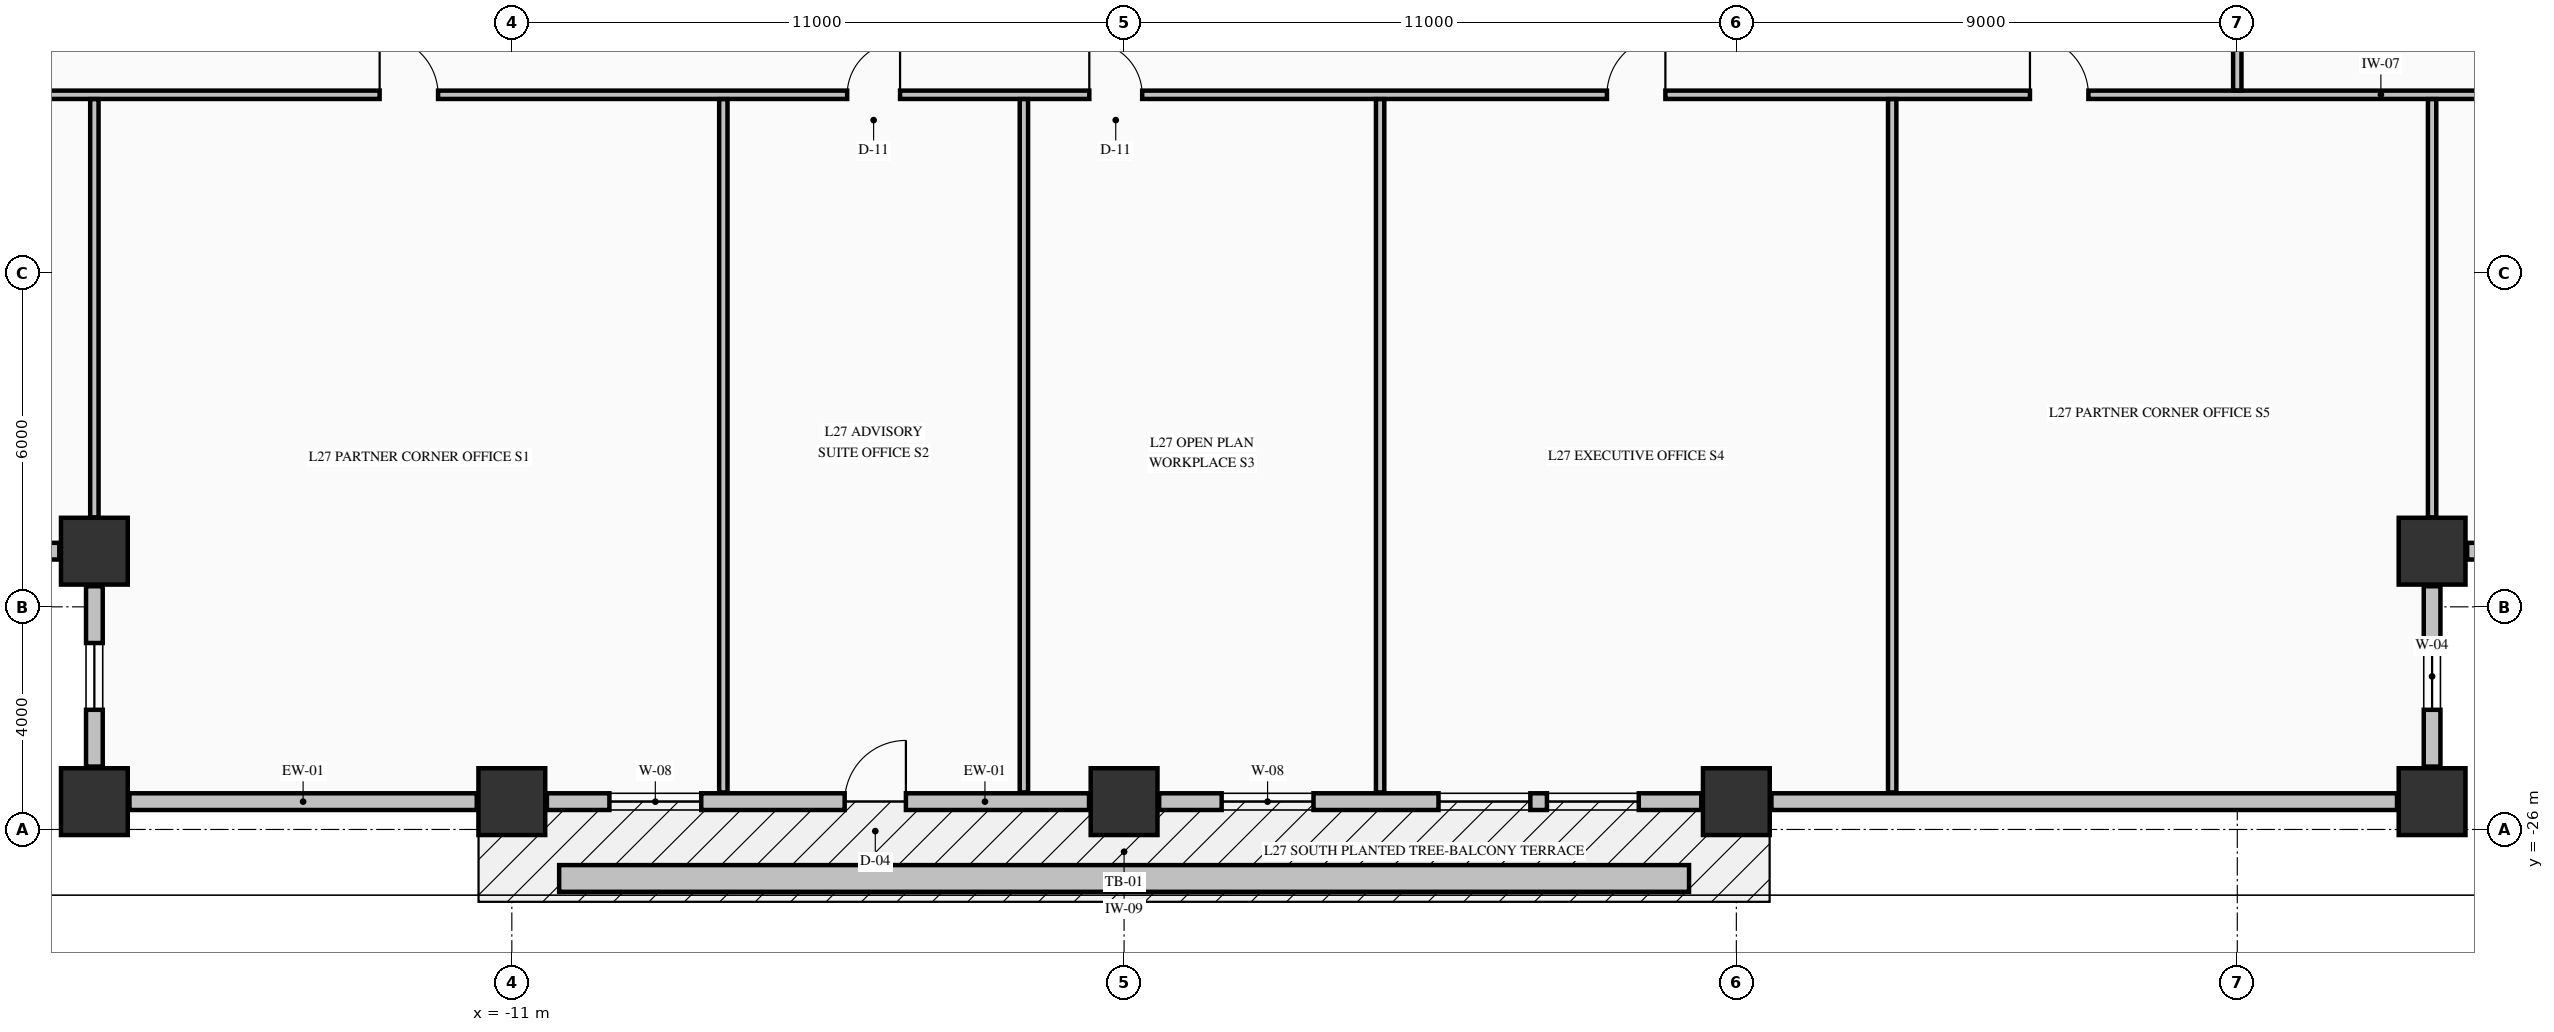
"""IFC4 building model, lengths in metres.
Left out: names, types, materials, properties, quantities, classifications, styles, units other than length and angle.
Written with IfcOpenShell. Run it as: python <this file> out.ifc"""

import sys

from ifc_helpers import new_model, si_unit, direction, frame, frame_2d, origin, origin_2d, place, context, subcontext, project, spatial, rectangle, extrude, element, fill, save


model = new_model("IFC4")
c1 = context("Model", 3, precision=1e-05, world=origin(), true_north=direction((0.0, 1.0)))
c2 = subcontext(c1, "Body", "Model", "MODEL_VIEW")
j1 = project(units=[si_unit("LENGTHUNIT", "METRE"), si_unit("PLANEANGLEUNIT", "RADIAN")], contexts=[c1])
p1 = place(None, origin())
s1 = spatial("IfcSite", under=j1, at=p1, CompositionType="ELEMENT")
p2 = place(p1, origin())
s2 = spatial("IfcBuilding", under=s1, at=p2, CompositionType="ELEMENT")
p3 = place(p2, frame((0.0, 0.0, 109.21)))
s3 = spatial("IfcBuildingStorey", under=s2, at=p3, CompositionType="ELEMENT", Elevation=109.21)
for number, where, z_axis, x_axis in (
    (1, (-18.5, -25.5, -0.25), (0.0, 0.0, 1.0), (1.0, 0.0, 0.0)),
    (2, (-11.0, -25.5, -0.25), (0.0, 0.0, 1.0), (1.0, 0.0, 0.0)),
    (3, (0.0, -25.5, -0.25), (0.0, 0.0, 1.0), (1.0, 0.0, 0.0)),
    (4, (11.0, -25.5, -0.25), (0.0, 0.0, 1.0), (1.0, 0.0, 0.0)),
    (5, (23.5, -25.5, -0.25), (0.0, 0.0, 1.0), (1.0, 0.0, 0.0)),
    (6, (-18.5, -21.0, -0.25), (0.0, 0.0, 1.0), (1.0, 0.0, 0.0)),
    (7, (23.5, -21.0, -0.25), (0.0, 0.0, 1.0), (1.0, 0.0, 0.0)),
):
    element("IfcColumn", number, at=place(p3, frame(where, z_axis=z_axis, x_axis=x_axis)), inside=s3, PredefinedType="COLUMN", context=c2, shape_type="SweptSolid", body=[
        extrude(rectangle(XDim=1.2, YDim=1.2, at=origin_2d()), origin(), (0.0, 0.0, 1.0), 3.57),
    ])
p4 = place(p3, frame((23.5, -24.87, 0.0), z_axis=(0.0, 0.0, 1.0), x_axis=(0.0, 1.0, 0.0)))
e8 = element("IfcWall", 8, at=p4, inside=s3, PredefinedType="STANDARD", context=c2, shape_type="SweptSolid", body=[
    extrude(rectangle(XDim=3.24, YDim=0.3, at=frame_2d((1.62, 0.0))), origin(), (0.0, 0.0, 1.0), 2.712),
])
p5 = place(p4, frame((1.02, 0.0, 0.82)))
e9 = element("IfcOpeningElement", 9, at=p5, cuts=e8, PredefinedType="OPENING", context=c2, shape_type="SweptSolid", body=[
    extrude(rectangle(XDim=1.2, YDim=1.65, at=frame_2d((0.6, 0.825))), frame((0.0, 0.16, 0.0), z_axis=(0.0, -1.0, 0.0), x_axis=(1.0, 0.0, 0.0)), (0.0, 0.0, 1.0), 0.32),
])
p6 = place(p3, frame((24.13, -21.0, 0.0), z_axis=(0.0, 0.0, 1.0), x_axis=(1.0, 0.0, 0.0)))
e10 = element("IfcWall", 10, at=p6, inside=s3, PredefinedType="STANDARD", context=c2, shape_type="SweptSolid", body=[
    extrude(rectangle(XDim=3.24, YDim=0.3, at=frame_2d((1.62, 0.0))), origin(), (0.0, 0.0, 1.0), 2.712),
])
p7 = place(p6, frame((1.02, 0.0, 0.82)))
e11 = element("IfcOpeningElement", 11, at=p7, cuts=e10, PredefinedType="OPENING", context=c2, shape_type="SweptSolid", body=[
    extrude(rectangle(XDim=1.2, YDim=1.65, at=frame_2d((0.6, 0.825))), frame((0.0, 0.16, 0.0), z_axis=(0.0, -1.0, 0.0), x_axis=(1.0, 0.0, 0.0)), (0.0, 0.0, 1.0), 0.32),
])
p8 = place(p3, frame((-22.37, -21.0, 0.0), z_axis=(0.0, 0.0, 1.0), x_axis=(1.0, 0.0, 0.0)))
e12 = element("IfcWall", 12, at=p8, inside=s3, PredefinedType="STANDARD", context=c2, shape_type="SweptSolid", body=[
    extrude(rectangle(XDim=3.24, YDim=0.3, at=frame_2d((1.62, 0.0))), origin(), (0.0, 0.0, 1.0), 2.712),
])
p9 = place(p8, frame((1.02, 0.0, 0.82)))
e13 = element("IfcOpeningElement", 13, at=p9, cuts=e12, PredefinedType="OPENING", context=c2, shape_type="SweptSolid", body=[
    extrude(rectangle(XDim=1.2, YDim=1.65, at=frame_2d((0.6, 0.825))), frame((0.0, 0.16, 0.0), z_axis=(0.0, -1.0, 0.0), x_axis=(1.0, 0.0, 0.0)), (0.0, 0.0, 1.0), 0.32),
])
p10 = place(p3, frame((-18.5, -21.63, 0.0), z_axis=(0.0, 0.0, 1.0), x_axis=(0.0, -1.0, 0.0)))
e14 = element("IfcWall", 14, at=p10, inside=s3, PredefinedType="STANDARD", context=c2, shape_type="SweptSolid", body=[
    extrude(rectangle(XDim=3.24, YDim=0.3, at=frame_2d((1.62, 0.0))), origin(), (0.0, 0.0, 1.0), 2.712),
])
p11 = place(p10, frame((1.02, 0.0, 0.82)))
e15 = element("IfcOpeningElement", 15, at=p11, cuts=e14, PredefinedType="OPENING", context=c2, shape_type="SweptSolid", body=[
    extrude(rectangle(XDim=1.2, YDim=1.65, at=frame_2d((0.6, 0.825))), frame((0.0, 0.16, 0.0), z_axis=(0.0, -1.0, 0.0), x_axis=(1.0, 0.0, 0.0)), (0.0, 0.0, 1.0), 0.32),
])
p12 = place(p3, frame((-17.87, -25.5, 0.0), z_axis=(0.0, 0.0, 1.0), x_axis=(1.0, 0.0, 0.0)))
e16 = element("IfcWall", 16, at=p12, inside=s3, PredefinedType="STANDARD", context=c2, shape_type="SweptSolid", body=[
    extrude(rectangle(XDim=6.24, YDim=0.3, at=frame_2d((3.12, 0.0))), origin(), (0.0, 0.0, 1.0), 2.712),
])
p13 = place(p3, frame((-10.37, -25.5, 0.0), z_axis=(0.0, 0.0, 1.0), x_axis=(1.0, 0.0, 0.0)))
e17 = element("IfcWall", 17, at=p13, inside=s3, PredefinedType="STANDARD", context=c2, shape_type="SweptSolid", body=[
    extrude(rectangle(XDim=9.74, YDim=0.3, at=frame_2d((4.87, 0.0))), origin(), (0.0, 0.0, 1.0), 2.712),
])
p14 = place(p13, frame((5.35, 0.0, 0.0)))
e18 = element("IfcOpeningElement", 18, at=p14, cuts=e17, PredefinedType="OPENING", context=c2, shape_type="SweptSolid", body=[
    extrude(rectangle(XDim=1.1, YDim=2.15, at=frame_2d((0.55, 1.075))), frame((0.0, 0.16, 0.0), z_axis=(0.0, -1.0, 0.0), x_axis=(1.0, 0.0, 0.0)), (0.0, 0.0, 1.0), 0.32),
])
p15 = place(p13, frame((1.123, 0.0, 0.8)))
e19 = element("IfcOpeningElement", 19, at=p15, cuts=e17, PredefinedType="OPENING", context=c2, shape_type="SweptSolid", body=[
    extrude(rectangle(XDim=1.65, YDim=1.7, at=frame_2d((0.825, 0.85))), frame((0.0, 0.16, 0.0), z_axis=(0.0, -1.0, 0.0), x_axis=(1.0, 0.0, 0.0)), (0.0, 0.0, 1.0), 0.32),
])
p16 = place(p3, frame((0.63, -25.5, 0.0), z_axis=(0.0, 0.0, 1.0), x_axis=(1.0, 0.0, 0.0)))
e20 = element("IfcWall", 20, at=p16, inside=s3, PredefinedType="STANDARD", context=c2, shape_type="SweptSolid", body=[
    extrude(rectangle(XDim=9.74, YDim=0.3, at=frame_2d((4.87, 0.0))), origin(), (0.0, 0.0, 1.0), 2.712),
])
p17 = place(p16, frame((1.123, 0.0, 0.8)))
e21 = element("IfcOpeningElement", 21, at=p17, cuts=e20, PredefinedType="OPENING", context=c2, shape_type="SweptSolid", body=[
    extrude(rectangle(XDim=1.65, YDim=1.7, at=frame_2d((0.825, 0.85))), frame((0.0, 0.16, 0.0), z_axis=(0.0, -1.0, 0.0), x_axis=(1.0, 0.0, 0.0)), (0.0, 0.0, 1.0), 0.32),
])
p18 = place(p16, frame((5.019, 0.0, 0.8)))
e22 = element("IfcOpeningElement", 22, at=p18, cuts=e20, PredefinedType="OPENING", context=c2, shape_type="SweptSolid", body=[
    extrude(rectangle(XDim=1.65, YDim=1.7, at=frame_2d((0.825, 0.85))), frame((0.0, 0.16, 0.0), z_axis=(0.0, -1.0, 0.0), x_axis=(1.0, 0.0, 0.0)), (0.0, 0.0, 1.0), 0.32),
])
p19 = place(p16, frame((6.967, 0.0, 0.8)))
e23 = element("IfcOpeningElement", 23, at=p19, cuts=e20, PredefinedType="OPENING", context=c2, shape_type="SweptSolid", body=[
    extrude(rectangle(XDim=1.65, YDim=1.7, at=frame_2d((0.825, 0.85))), frame((0.0, 0.16, 0.0), z_axis=(0.0, -1.0, 0.0), x_axis=(1.0, 0.0, 0.0)), (0.0, 0.0, 1.0), 0.32),
])
p20 = place(p3, frame((11.63, -25.5, 0.0), z_axis=(0.0, 0.0, 1.0), x_axis=(1.0, 0.0, 0.0)))
e24 = element("IfcWall", 24, at=p20, inside=s3, PredefinedType="STANDARD", context=c2, shape_type="SweptSolid", body=[
    extrude(rectangle(XDim=11.24, YDim=0.3, at=frame_2d((5.62, 0.0))), origin(), (0.0, 0.0, 1.0), 2.712),
])
p21 = place(p3, frame((-22.835, -12.8, 0.0), z_axis=(0.0, 0.0, 1.0), x_axis=(1.0, 0.0, 0.0)))
e25 = element("IfcWall", 25, at=p21, inside=s3, PredefinedType="PARTITIONING", context=c2, shape_type="SweptSolid", body=[
    extrude(rectangle(XDim=50.67, YDim=0.15, at=frame_2d((25.335, 0.0))), origin(), (0.0, 0.0, 1.0), 3.32),
])
p22 = place(p21, frame((9.46, 0.0, 0.0)))
e26 = element("IfcOpeningElement", 26, at=p22, cuts=e25, PredefinedType="OPENING", context=c2, shape_type="SweptSolid", body=[
    extrude(rectangle(XDim=1.05, YDim=2.15, at=frame_2d((0.525, 1.075))), frame((0.0, 0.085, 0.0), z_axis=(0.0, -1.0, 0.0), x_axis=(1.0, 0.0, 0.0)), (0.0, 0.0, 1.0), 0.17),
])
p23 = place(p21, frame((17.86, 0.0, 0.0)))
e27 = element("IfcOpeningElement", 27, at=p23, cuts=e25, PredefinedType="OPENING", context=c2, shape_type="SweptSolid", body=[
    extrude(rectangle(XDim=0.95, YDim=2.15, at=frame_2d((0.475, 1.075))), frame((0.0, 0.085, 0.0), z_axis=(0.0, -1.0, 0.0), x_axis=(1.0, 0.0, 0.0)), (0.0, 0.0, 1.0), 0.17),
])
p24 = place(p21, frame((22.21, 0.0, 0.0)))
e28 = element("IfcOpeningElement", 28, at=p24, cuts=e25, PredefinedType="OPENING", context=c2, shape_type="SweptSolid", body=[
    extrude(rectangle(XDim=0.95, YDim=2.15, at=frame_2d((0.475, 1.075))), frame((0.0, 0.085, 0.0), z_axis=(0.0, -1.0, 0.0), x_axis=(1.0, 0.0, 0.0)), (0.0, 0.0, 1.0), 0.17),
])
p25 = place(p21, frame((31.51, 0.0, 0.0)))
e29 = element("IfcOpeningElement", 29, at=p25, cuts=e25, PredefinedType="OPENING", context=c2, shape_type="SweptSolid", body=[
    extrude(rectangle(XDim=1.05, YDim=2.15, at=frame_2d((0.525, 1.075))), frame((0.0, 0.085, 0.0), z_axis=(0.0, -1.0, 0.0), x_axis=(1.0, 0.0, 0.0)), (0.0, 0.0, 1.0), 0.17),
])
p26 = place(p21, frame((39.11, 0.0, 0.0)))
e30 = element("IfcOpeningElement", 30, at=p26, cuts=e25, PredefinedType="OPENING", context=c2, shape_type="SweptSolid", body=[
    extrude(rectangle(XDim=1.05, YDim=2.15, at=frame_2d((0.525, 1.075))), frame((0.0, 0.085, 0.0), z_axis=(0.0, -1.0, 0.0), x_axis=(1.0, 0.0, 0.0)), (0.0, 0.0, 1.0), 0.17),
])
p27 = place(p3, frame((-18.5, -20.394, 0.0), z_axis=(0.0, 0.0, 1.0), x_axis=(0.0, 1.0, 0.0)))
e31 = element("IfcWall", 31, at=p27, inside=s3, PredefinedType="PARTITIONING", context=c2, shape_type="SweptSolid", body=[
    extrude(rectangle(XDim=7.516, YDim=0.15, at=frame_2d((3.758, 0.0))), origin(), (0.0, 0.0, 1.0), 3.32),
])
for number, where, z_axis, x_axis in (
    (32, (-7.2, -25.335, 0.0), (0.0, 0.0, 1.0), (0.0, 1.0, 0.0)),
    (33, (-1.8, -25.335, 0.0), (0.0, 0.0, 1.0), (0.0, 1.0, 0.0)),
    (34, (4.6, -25.335, 0.0), (0.0, 0.0, 1.0), (0.0, 1.0, 0.0)),
    (35, (13.8, -25.335, 0.0), (0.0, 0.0, 1.0), (0.0, 1.0, 0.0)),
):
    element("IfcWall", number, at=place(p3, frame(where, z_axis=z_axis, x_axis=x_axis)), inside=s3, PredefinedType="PARTITIONING", context=c2, shape_type="SweptSolid", body=[
        extrude(rectangle(XDim=12.457, YDim=0.15, at=frame_2d((6.229, 0.0))), origin(), (0.0, 0.0, 1.0), 3.32),
    ])
p28 = place(p3, frame((20.0, -12.722, 0.0), z_axis=(0.0, 0.0, 1.0), x_axis=(0.0, 1.0, 0.0)))
e36 = element("IfcWall", 36, at=p28, inside=s3, PredefinedType="PARTITIONING", context=c2, shape_type="SweptSolid", body=[
    extrude(rectangle(XDim=2.266, YDim=0.15, at=frame_2d((1.133, 0.0))), origin(), (0.0, 0.0, 1.0), 2.81),
])
p29 = place(p28, frame((0.867, 0.0, 0.0)))
e37 = element("IfcOpeningElement", 37, at=p29, cuts=e36, PredefinedType="OPENING", context=c2, shape_type="SweptSolid", body=[
    extrude(rectangle(XDim=0.95, YDim=2.15, at=frame_2d((0.475, 1.075))), frame((0.0, 0.085, 0.0), z_axis=(0.0, -1.0, 0.0), x_axis=(1.0, 0.0, 0.0)), (0.0, 0.0, 1.0), 0.17),
])
p30 = place(p3, frame((23.5, -20.394, 0.0), z_axis=(0.0, 0.0, 1.0), x_axis=(0.0, 1.0, 0.0)))
e38 = element("IfcWall", 38, at=p30, inside=s3, PredefinedType="PARTITIONING", context=c2, shape_type="SweptSolid", body=[
    extrude(rectangle(XDim=7.516, YDim=0.15, at=frame_2d((3.758, 0.0))), origin(), (0.0, 0.0, 1.0), 3.32),
])
p31 = place(p3, frame((-10.15, -26.88, -0.04), z_axis=(0.0, 0.0, 1.0), x_axis=(1.0, 0.0, 0.0)))
e39 = element("IfcWall", 39, at=p31, inside=s3, PredefinedType="PARAPET", context=c2, shape_type="SweptSolid", body=[
    extrude(rectangle(XDim=20.3, YDim=0.48, at=frame_2d((10.15, 0.0))), origin(), (0.0, 0.0, 1.0), 0.52),
])
p32 = place(p5, origin())
e40 = element("IfcWindow", 40, at=p32, inside=s3, PartitioningType="SINGLE_PANEL", PredefinedType="WINDOW", context=c2, shape_type="SweptSolid", body=[
    extrude(rectangle(XDim=1.2, YDim=1.65, at=frame_2d((0.6, 0.825))), frame((0.0, 0.03, 0.0), z_axis=(0.0, -1.0, 0.0), x_axis=(1.0, 0.0, 0.0)), (0.0, 0.0, 1.0), 0.06),
])
fill(e9, e40)
p33 = place(p11, origin())
e41 = element("IfcWindow", 41, at=p33, inside=s3, PartitioningType="SINGLE_PANEL", PredefinedType="WINDOW", context=c2, shape_type="SweptSolid", body=[
    extrude(rectangle(XDim=1.2, YDim=1.65, at=frame_2d((0.6, 0.825))), frame((0.0, 0.03, 0.0), z_axis=(0.0, -1.0, 0.0), x_axis=(1.0, 0.0, 0.0)), (0.0, 0.0, 1.0), 0.06),
])
fill(e15, e41)
p34 = place(p14, origin())
e42 = element("IfcDoor", 42, at=p34, inside=s3, OperationType="SINGLE_SWING_RIGHT", PredefinedType="DOOR", context=c2, shape_type="SweptSolid", body=[
    extrude(rectangle(XDim=1.1, YDim=2.15, at=frame_2d((0.55, 1.075))), frame((0.0, 0.025, 0.0), z_axis=(0.0, -1.0, 0.0), x_axis=(1.0, 0.0, 0.0)), (0.0, 0.0, 1.0), 0.05),
])
fill(e18, e42)
p35 = place(p15, origin())
e43 = element("IfcWindow", 43, at=p35, inside=s3, PartitioningType="SINGLE_PANEL", PredefinedType="WINDOW", context=c2, shape_type="SweptSolid", body=[
    extrude(rectangle(XDim=1.65, YDim=1.7, at=frame_2d((0.825, 0.85))), frame((0.0, 0.03, 0.0), z_axis=(0.0, -1.0, 0.0), x_axis=(1.0, 0.0, 0.0)), (0.0, 0.0, 1.0), 0.06),
])
fill(e19, e43)
p36 = place(p17, origin())
e44 = element("IfcWindow", 44, at=p36, inside=s3, PartitioningType="SINGLE_PANEL", PredefinedType="WINDOW", context=c2, shape_type="SweptSolid", body=[
    extrude(rectangle(XDim=1.65, YDim=1.7, at=frame_2d((0.825, 0.85))), frame((0.0, 0.03, 0.0), z_axis=(0.0, -1.0, 0.0), x_axis=(1.0, 0.0, 0.0)), (0.0, 0.0, 1.0), 0.06),
])
fill(e21, e44)
p37 = place(p18, origin())
e45 = element("IfcWindow", 45, at=p37, inside=s3, PartitioningType="SINGLE_PANEL", PredefinedType="WINDOW", context=c2, shape_type="SweptSolid", body=[
    extrude(rectangle(XDim=1.65, YDim=1.7, at=frame_2d((0.825, 0.85))), frame((0.0, 0.03, 0.0), z_axis=(0.0, -1.0, 0.0), x_axis=(1.0, 0.0, 0.0)), (0.0, 0.0, 1.0), 0.06),
])
fill(e22, e45)
p38 = place(p19, origin())
e46 = element("IfcWindow", 46, at=p38, inside=s3, PartitioningType="SINGLE_PANEL", PredefinedType="WINDOW", context=c2, shape_type="SweptSolid", body=[
    extrude(rectangle(XDim=1.65, YDim=1.7, at=frame_2d((0.825, 0.85))), frame((0.0, 0.03, 0.0), z_axis=(0.0, -1.0, 0.0), x_axis=(1.0, 0.0, 0.0)), (0.0, 0.0, 1.0), 0.06),
])
fill(e23, e46)
p39 = place(p22, origin())
e47 = element("IfcDoor", 47, at=p39, inside=s3, OperationType="SINGLE_SWING_LEFT", PredefinedType="DOOR", context=c2, shape_type="SweptSolid", body=[
    extrude(rectangle(XDim=1.05, YDim=2.15, at=frame_2d((0.525, 1.075))), frame((0.0, 0.025, 0.0), z_axis=(0.0, -1.0, 0.0), x_axis=(1.0, 0.0, 0.0)), (0.0, 0.0, 1.0), 0.05),
])
fill(e26, e47)
p40 = place(p23, origin())
e48 = element("IfcDoor", 48, at=p40, inside=s3, OperationType="SINGLE_SWING_RIGHT", PredefinedType="DOOR", context=c2, shape_type="SweptSolid", body=[
    extrude(rectangle(XDim=0.95, YDim=2.15, at=frame_2d((0.475, 1.075))), frame((0.0, 0.025, 0.0), z_axis=(0.0, -1.0, 0.0), x_axis=(1.0, 0.0, 0.0)), (0.0, 0.0, 1.0), 0.05),
])
fill(e27, e48)
p41 = place(p24, origin())
e49 = element("IfcDoor", 49, at=p41, inside=s3, OperationType="SINGLE_SWING_LEFT", PredefinedType="DOOR", context=c2, shape_type="SweptSolid", body=[
    extrude(rectangle(XDim=0.95, YDim=2.15, at=frame_2d((0.475, 1.075))), frame((0.0, 0.025, 0.0), z_axis=(0.0, -1.0, 0.0), x_axis=(1.0, 0.0, 0.0)), (0.0, 0.0, 1.0), 0.05),
])
fill(e28, e49)
p42 = place(p25, origin())
e50 = element("IfcDoor", 50, at=p42, inside=s3, OperationType="SINGLE_SWING_RIGHT", PredefinedType="DOOR", context=c2, shape_type="SweptSolid", body=[
    extrude(rectangle(XDim=1.05, YDim=2.15, at=frame_2d((0.525, 1.075))), frame((0.0, 0.025, 0.0), z_axis=(0.0, -1.0, 0.0), x_axis=(1.0, 0.0, 0.0)), (0.0, 0.0, 1.0), 0.05),
])
fill(e29, e50)
p43 = place(p26, origin())
e51 = element("IfcDoor", 51, at=p43, inside=s3, OperationType="SINGLE_SWING_LEFT", PredefinedType="DOOR", context=c2, shape_type="SweptSolid", body=[
    extrude(rectangle(XDim=1.05, YDim=2.15, at=frame_2d((0.525, 1.075))), frame((0.0, 0.025, 0.0), z_axis=(0.0, -1.0, 0.0), x_axis=(1.0, 0.0, 0.0)), (0.0, 0.0, 1.0), 0.05),
])
fill(e30, e51)
save(model, sys.argv[1])
